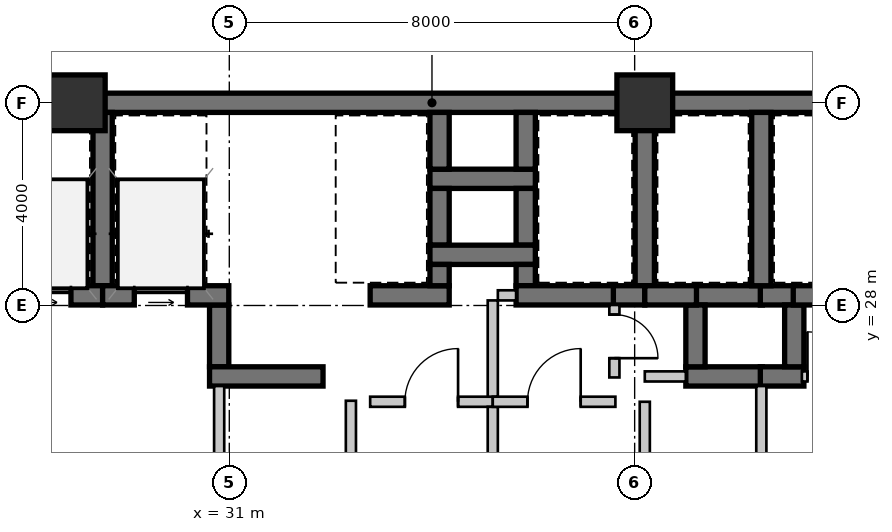
"""IFC4 building model, lengths in metres.
Left out: names, types, materials, properties, quantities, classifications, styles, units other than length and angle.
Written with IfcOpenShell. Run it as: python <this file> out.ifc"""

import sys

from ifc_helpers import new_model, si_unit, direction, frame, frame_2d, origin, origin_2d, place, context, subcontext, project, spatial, rectangle, extrude, source, transform, mapped, element, fill, save


model = new_model("IFC4")
c1 = context("Model", 3, precision=1e-05, world=origin(), true_north=direction((0.0, 1.0)))
c2 = subcontext(c1, "Body", "Model", "MODEL_VIEW")
j1 = project(units=[si_unit("LENGTHUNIT", "METRE"), si_unit("PLANEANGLEUNIT", "RADIAN")], contexts=[c1])
p1 = place(None, origin())
s1 = spatial("IfcSite", under=j1, at=p1, CompositionType="ELEMENT")
p2 = place(p1, origin())
s2 = spatial("IfcBuilding", under=s1, at=p2, CompositionType="ELEMENT")
p3 = place(p2, frame((0.0, 0.0, 12.95)))
s3 = spatial("IfcBuildingStorey", under=s2, at=p3, CompositionType="ELEMENT", Elevation=12.95)
m1 = source(origin(), c2, "Body", "SweptSolid", [
    extrude(rectangle(XDim=1.1, YDim=1.1, at=origin_2d()), origin(), (0.0, 0.0, 1.0), 3.85),
])
for number, where, z_axis, x_axis in (
    (1, (28.0, 32.0, 0.0), (0.0, 0.0, 1.0), (1.0, 0.0, 0.0)),
    (2, (39.2, 32.0, 0.0), (0.0, 0.0, 1.0), (1.0, 0.0, 0.0)),
):
    element("IfcColumn", number, at=place(p3, frame(where, z_axis=z_axis, x_axis=x_axis)), inside=s3, PredefinedType="COLUMN", context=c2, shape_type="MappedRepresentation", body=[
        mapped(m1, transform((0.0, 0.0, 0.0), scale=1.0)),
    ])
m2 = source(origin(), c2, "Body", "SweptSolid", [
    extrude(rectangle(XDim=9.19, YDim=0.38, at=frame_2d((4.595, 0.0))), origin(), (0.0, 0.0, 1.0), 3.43),
])
p4 = place(p3, frame((18.81, 32.0, 0.0), z_axis=(0.0, 0.0, 1.0), x_axis=(1.0, 0.0, 0.0)))
e3 = element("IfcWall", 3, at=p4, inside=s3, PredefinedType="SHEAR", context=c2, shape_type="MappedRepresentation", body=[
    mapped(m2, transform((0.0, 0.0, 0.0), scale=1.0)),
])
m3 = source(origin(), c2, "Body", "SweptSolid", [
    extrude(rectangle(XDim=11.2, YDim=0.38, at=frame_2d((5.6, 0.0))), origin(), (0.0, 0.0, 1.0), 3.43),
])
p5 = place(p3, frame((28.0, 32.0, 0.0), z_axis=(0.0, 0.0, 1.0), x_axis=(1.0, 0.0, 0.0)))
e4 = element("IfcWall", 4, at=p5, inside=s3, PredefinedType="SHEAR", context=c2, shape_type="MappedRepresentation", body=[
    mapped(m3, transform((0.0, 0.0, 0.0), scale=1.0)),
])
m4 = source(origin(), c2, "Body", "SweptSolid", [
    extrude(rectangle(XDim=11.99, YDim=0.38, at=frame_2d((5.995, 0.0))), origin(), (0.0, 0.0, 1.0), 3.43),
])
p6 = place(p3, frame((39.2, 32.0, 0.0), z_axis=(0.0, 0.0, 1.0), x_axis=(1.0, 0.0, 0.0)))
e5 = element("IfcWall", 5, at=p6, inside=s3, PredefinedType="SHEAR", context=c2, shape_type="MappedRepresentation", body=[
    mapped(m4, transform((0.0, 0.0, 0.0), scale=1.0)),
])
m5 = source(origin(), c2, "Body", "SweptSolid", [
    extrude(rectangle(XDim=2.08, YDim=0.38, at=frame_2d((1.04, 0.0))), origin(), (0.0, 0.0, 1.0), 3.43),
])
p7 = place(p3, frame((34.96, 30.5, 0.0), z_axis=(0.0, 0.0, 1.0), x_axis=(1.0, 0.0, 0.0)))
e6 = element("IfcWall", 6, at=p7, inside=s3, PredefinedType="SHEAR", context=c2, shape_type="MappedRepresentation", body=[
    mapped(m5, transform((0.0, 0.0, 0.0), scale=1.0)),
])
m6 = source(origin(), c2, "Body", "SweptSolid", [
    extrude(rectangle(XDim=1.12, YDim=0.38, at=frame_2d((0.56, 0.0))), origin(), (0.0, 0.0, 1.0), 3.43),
])
for number, where, z_axis, x_axis in (
    (7, (35.15, 31.81, 0.0), (0.0, 0.0, 1.0), (0.0, -1.0, 0.0)),
    (8, (36.85, 30.69, 0.0), (0.0, 0.0, 1.0), (0.0, 1.0, 0.0)),
    (9, (35.15, 30.31, 0.0), (0.0, 0.0, 1.0), (0.0, -1.0, 0.0)),
    (10, (36.85, 29.19, 0.0), (0.0, 0.0, 1.0), (0.0, 1.0, 0.0)),
):
    element("IfcWall", number, at=place(p3, frame(where, z_axis=z_axis, x_axis=x_axis)), inside=s3, PredefinedType="SHEAR", context=c2, shape_type="MappedRepresentation", body=[
        mapped(m6, transform((0.0, 0.0, 0.0), scale=1.0)),
    ])
p8 = place(p3, frame((34.96, 29.0, 0.0), z_axis=(0.0, 0.0, 1.0), x_axis=(1.0, 0.0, 0.0)))
e11 = element("IfcWall", 11, at=p8, inside=s3, PredefinedType="SHEAR", context=c2, shape_type="MappedRepresentation", body=[
    mapped(m5, transform((0.0, 0.0, 0.0), scale=1.0)),
])
m7 = source(origin(), c2, "Body", "SweptSolid", [
    extrude(rectangle(XDim=1.22, YDim=0.38, at=frame_2d((0.61, 0.0))), origin(), (0.0, 0.0, 1.0), 3.43),
])
p9 = place(p3, frame((30.8, 28.01, 0.0), z_axis=(0.0, 0.0, 1.0), x_axis=(0.0, -1.0, 0.0)))
e12 = element("IfcWall", 12, at=p9, inside=s3, PredefinedType="SHEAR", context=c2, shape_type="MappedRepresentation", body=[
    mapped(m7, transform((0.0, 0.0, 0.0), scale=1.0)),
])
m8 = source(origin(), c2, "Body", "SweptSolid", [
    extrude(rectangle(XDim=2.24, YDim=0.38, at=frame_2d((1.12, 0.0))), origin(), (0.0, 0.0, 1.0), 3.43),
])
p10 = place(p3, frame((30.61, 26.6, 0.0), z_axis=(0.0, 0.0, 1.0), x_axis=(1.0, 0.0, 0.0)))
e13 = element("IfcWall", 13, at=p10, inside=s3, PredefinedType="SHEAR", context=c2, shape_type="MappedRepresentation", body=[
    mapped(m8, transform((0.0, 0.0, 0.0), scale=1.0)),
])
m9 = source(origin(), c2, "Body", "SweptSolid", [
    extrude(rectangle(XDim=1.32, YDim=0.38, at=frame_2d((0.66, 0.0))), origin(), (0.0, 0.0, 1.0), 3.43),
])
p11 = place(p3, frame((41.52, 28.2, 0.0), z_axis=(0.0, 0.0, 1.0), x_axis=(-1.0, 0.0, 0.0)))
e14 = element("IfcWall", 14, at=p11, inside=s3, PredefinedType="SHEAR", context=c2, shape_type="MappedRepresentation", body=[
    mapped(m9, transform((0.0, 0.0, 0.0), scale=1.0)),
])
m10 = source(origin(), c2, "Body", "SweptSolid", [
    extrude(rectangle(XDim=0.67, YDim=0.38, at=frame_2d((0.335, 0.0))), origin(), (0.0, 0.0, 1.0), 3.43),
])
p12 = place(p3, frame((42.15, 28.2, 0.0), z_axis=(0.0, 0.0, 1.0), x_axis=(-1.0, 0.0, 0.0)))
e15 = element("IfcWall", 15, at=p12, inside=s3, PredefinedType="SHEAR", context=c2, shape_type="MappedRepresentation", body=[
    mapped(m10, transform((0.0, 0.0, 0.0), scale=1.0)),
])
m11 = source(origin(), c2, "Body", "SweptSolid", [
    extrude(rectangle(XDim=1.51, YDim=0.38, at=frame_2d((0.755, 0.0))), origin(), (0.0, 0.0, 1.0), 3.43),
])
p13 = place(p3, frame((40.01, 26.6, 0.0), z_axis=(0.0, 0.0, 1.0), x_axis=(1.0, 0.0, 0.0)))
e16 = element("IfcWall", 16, at=p13, inside=s3, PredefinedType="SHEAR", context=c2, shape_type="MappedRepresentation", body=[
    mapped(m11, transform((0.0, 0.0, 0.0), scale=1.0)),
])
p14 = place(p3, frame((40.2, 28.01, 0.0), z_axis=(0.0, 0.0, 1.0), x_axis=(0.0, -1.0, 0.0)))
e17 = element("IfcWall", 17, at=p14, inside=s3, PredefinedType="SHEAR", context=c2, shape_type="MappedRepresentation", body=[
    mapped(m7, transform((0.0, 0.0, 0.0), scale=1.0)),
])
m12 = source(origin(), c2, "Body", "SweptSolid", [
    extrude(rectangle(XDim=0.86, YDim=0.38, at=frame_2d((0.43, 0.0))), origin(), (0.0, 0.0, 1.0), 3.43),
])
p15 = place(p3, frame((41.48, 26.6, 0.0), z_axis=(0.0, 0.0, 1.0), x_axis=(1.0, 0.0, 0.0)))
e18 = element("IfcWall", 18, at=p15, inside=s3, PredefinedType="SHEAR", context=c2, shape_type="MappedRepresentation", body=[
    mapped(m12, transform((0.0, 0.0, 0.0), scale=1.0)),
])
p16 = place(p3, frame((42.15, 26.79, 0.0), z_axis=(0.0, 0.0, 1.0), x_axis=(0.0, 1.0, 0.0)))
e19 = element("IfcWall", 19, at=p16, inside=s3, PredefinedType="SHEAR", context=c2, shape_type="MappedRepresentation", body=[
    mapped(m7, transform((0.0, 0.0, 0.0), scale=1.0)),
])
m13 = source(origin(), c2, "Body", "SweptSolid", [
    extrude(rectangle(XDim=3.42, YDim=0.38, at=frame_2d((1.71, 0.0))), origin(), (0.0, 0.0, 1.0), 3.43),
])
p17 = place(p3, frame((28.5, 28.39, 0.0), z_axis=(0.0, 0.0, 1.0), x_axis=(0.0, 1.0, 0.0)))
e20 = element("IfcWall", 20, at=p17, inside=s3, PredefinedType="SHEAR", context=c2, shape_type="MappedRepresentation", body=[
    mapped(m13, transform((0.0, 0.0, 0.0), scale=1.0)),
])
m14 = source(origin(), c2, "Body", "SweptSolid", [
    extrude(rectangle(XDim=2.07, YDim=0.38, at=frame_2d((1.035, 0.0))), origin(), (0.0, 0.0, 1.0), 3.43),
])
p18 = place(p3, frame((26.43, 28.2, 0.0), z_axis=(0.0, 0.0, 1.0), x_axis=(1.0, 0.0, 0.0)))
e21 = element("IfcWall", 21, at=p18, inside=s3, PredefinedType="SHEAR", context=c2, shape_type="MappedRepresentation", body=[
    mapped(m14, transform((0.0, 0.0, 0.0), scale=1.0)),
])
m15 = source(origin(), c2, "Body", "SweptSolid", [
    extrude(rectangle(XDim=1.05, YDim=2.15, at=frame_2d((0.525, 1.075))), frame((0.0, 0.2, 0.0), z_axis=(0.0, -1.0, 0.0), x_axis=(1.0, 0.0, 0.0)), (0.0, 0.0, 1.0), 0.4),
])
p19 = place(p18, frame((0.395, 0.0, 0.0)))
e22 = element("IfcOpeningElement", 22, at=p19, cuts=e21, PredefinedType="OPENING", context=c2, shape_type="MappedRepresentation", body=[
    mapped(m15, transform((0.0, 0.0, 0.0), scale=1.0)),
])
m16 = source(origin(), c2, "Body", "SweptSolid", [
    extrude(rectangle(XDim=2.49, YDim=0.38, at=frame_2d((1.245, 0.0))), origin(), (0.0, 0.0, 1.0), 3.43),
])
p20 = place(p3, frame((28.5, 28.2, 0.0), z_axis=(0.0, 0.0, 1.0), x_axis=(1.0, 0.0, 0.0)))
e23 = element("IfcWall", 23, at=p20, inside=s3, PredefinedType="SHEAR", context=c2, shape_type="MappedRepresentation", body=[
    mapped(m16, transform((0.0, 0.0, 0.0), scale=1.0)),
])
p21 = place(p20, frame((0.625, 0.0, 0.0)))
e24 = element("IfcOpeningElement", 24, at=p21, cuts=e23, PredefinedType="OPENING", context=c2, shape_type="MappedRepresentation", body=[
    mapped(m15, transform((0.0, 0.0, 0.0), scale=1.0)),
])
m17 = source(origin(), c2, "Body", "SweptSolid", [
    extrude(rectangle(XDim=2.31, YDim=0.2, at=frame_2d((1.155, 0.0))), origin(), (0.0, 0.0, 1.0), 3.43),
])
p22 = place(p3, frame((30.8, 26.41, 0.0), z_axis=(0.0, 0.0, 1.0), x_axis=(0.0, -1.0, 0.0)))
e25 = element("IfcWall", 25, at=p22, inside=s3, PredefinedType="SOLIDWALL", context=c2, shape_type="MappedRepresentation", body=[
    mapped(m17, transform((0.0, 0.0, 0.0), scale=1.0)),
])
m18 = source(origin(), c2, "Body", "SweptSolid", [
    extrude(rectangle(XDim=1.56, YDim=0.38, at=frame_2d((0.78, 0.0))), origin(), (0.0, 0.0, 1.0), 3.43),
])
p23 = place(p3, frame((33.78, 28.2, 0.0), z_axis=(0.0, 0.0, 1.0), x_axis=(1.0, 0.0, 0.0)))
e26 = element("IfcWall", 26, at=p23, inside=s3, PredefinedType="SHEAR", context=c2, shape_type="MappedRepresentation", body=[
    mapped(m18, transform((0.0, 0.0, 0.0), scale=1.0)),
])
m19 = source(origin(), c2, "Body", "SweptSolid", [
    extrude(rectangle(XDim=0.42, YDim=0.38, at=frame_2d((0.21, 0.0))), origin(), (0.0, 0.0, 1.0), 3.43),
])
p24 = place(p3, frame((35.15, 28.39, 0.0), z_axis=(0.0, 0.0, 1.0), x_axis=(0.0, 1.0, 0.0)))
e27 = element("IfcWall", 27, at=p24, inside=s3, PredefinedType="SHEAR", context=c2, shape_type="MappedRepresentation", body=[
    mapped(m19, transform((0.0, 0.0, 0.0), scale=1.0)),
])
p25 = place(p3, frame((39.2, 28.39, 0.0), z_axis=(0.0, 0.0, 1.0), x_axis=(0.0, 1.0, 0.0)))
e28 = element("IfcWall", 28, at=p25, inside=s3, PredefinedType="SHEAR", context=c2, shape_type="MappedRepresentation", body=[
    mapped(m13, transform((0.0, 0.0, 0.0), scale=1.0)),
])
p26 = place(p3, frame((36.85, 28.81, 0.0), z_axis=(0.0, 0.0, 1.0), x_axis=(0.0, -1.0, 0.0)))
e29 = element("IfcWall", 29, at=p26, inside=s3, PredefinedType="SHEAR", context=c2, shape_type="MappedRepresentation", body=[
    mapped(m19, transform((0.0, 0.0, 0.0), scale=1.0)),
])
m20 = source(origin(), c2, "Body", "SweptSolid", [
    extrude(rectangle(XDim=1.96, YDim=0.38, at=frame_2d((0.98, 0.0))), origin(), (0.0, 0.0, 1.0), 3.43),
])
p27 = place(p3, frame((36.66, 28.2, 0.0), z_axis=(0.0, 0.0, 1.0), x_axis=(1.0, 0.0, 0.0)))
e30 = element("IfcWall", 30, at=p27, inside=s3, PredefinedType="SHEAR", context=c2, shape_type="MappedRepresentation", body=[
    mapped(m20, transform((0.0, 0.0, 0.0), scale=1.0)),
])
m21 = source(origin(), c2, "Body", "SweptSolid", [
    extrude(rectangle(XDim=0.62, YDim=0.38, at=frame_2d((0.31, 0.0))), origin(), (0.0, 0.0, 1.0), 3.43),
])
p28 = place(p3, frame((38.58, 28.2, 0.0), z_axis=(0.0, 0.0, 1.0), x_axis=(1.0, 0.0, 0.0)))
e31 = element("IfcWall", 31, at=p28, inside=s3, PredefinedType="SHEAR", context=c2, shape_type="MappedRepresentation", body=[
    mapped(m21, transform((0.0, 0.0, 0.0), scale=1.0)),
])
p29 = place(p3, frame((41.5, 28.39, 0.0), z_axis=(0.0, 0.0, 1.0), x_axis=(0.0, 1.0, 0.0)))
e32 = element("IfcWall", 32, at=p29, inside=s3, PredefinedType="SHEAR", context=c2, shape_type="MappedRepresentation", body=[
    mapped(m13, transform((0.0, 0.0, 0.0), scale=1.0)),
])
m22 = source(origin(), c2, "Body", "SweptSolid", [
    extrude(rectangle(XDim=1.02, YDim=0.38, at=frame_2d((0.51, 0.0))), origin(), (0.0, 0.0, 1.0), 3.43),
])
p30 = place(p3, frame((39.2, 28.2, 0.0), z_axis=(0.0, 0.0, 1.0), x_axis=(1.0, 0.0, 0.0)))
e33 = element("IfcWall", 33, at=p30, inside=s3, PredefinedType="SHEAR", context=c2, shape_type="MappedRepresentation", body=[
    mapped(m22, transform((0.0, 0.0, 0.0), scale=1.0)),
])
m23 = source(origin(), c2, "Body", "SweptSolid", [
    extrude(rectangle(XDim=1.44, YDim=0.38, at=frame_2d((0.72, 0.0))), origin(), (0.0, 0.0, 1.0), 3.43),
])
p31 = place(p3, frame((42.13, 28.2, 0.0), z_axis=(0.0, 0.0, 1.0), x_axis=(1.0, 0.0, 0.0)))
e34 = element("IfcWall", 34, at=p31, inside=s3, PredefinedType="SHEAR", context=c2, shape_type="MappedRepresentation", body=[
    mapped(m23, transform((0.0, 0.0, 0.0), scale=1.0)),
])
m24 = source(origin(), c2, "Body", "SweptSolid", [
    extrude(rectangle(XDim=2.02, YDim=0.2, at=frame_2d((1.01, 0.0))), origin(), (0.0, 0.0, 1.0), 3.43),
])
p32 = place(p3, frame((33.4, 26.12, 0.0), z_axis=(0.0, 0.0, 1.0), x_axis=(0.0, -1.0, 0.0)))
e35 = element("IfcWall", 35, at=p32, inside=s3, PredefinedType="SOLIDWALL", context=c2, shape_type="MappedRepresentation", body=[
    mapped(m24, transform((0.0, 0.0, 0.0), scale=1.0)),
])
m25 = source(origin(), c2, "Body", "SweptSolid", [
    extrude(rectangle(XDim=2.42, YDim=0.2, at=frame_2d((1.21, 0.0))), origin(), (0.0, 0.0, 1.0), 3.43),
])
p33 = place(p3, frame((33.78, 26.1, 0.0), z_axis=(0.0, 0.0, 1.0), x_axis=(1.0, 0.0, 0.0)))
e36 = element("IfcWall", 36, at=p33, inside=s3, PredefinedType="SOLIDWALL", context=c2, shape_type="MappedRepresentation", body=[
    mapped(m25, transform((0.0, 0.0, 0.0), scale=1.0)),
])
m26 = source(origin(), c2, "Body", "SweptSolid", [
    extrude(rectangle(XDim=1.05, YDim=2.1, at=frame_2d((0.525, 1.05))), frame((0.0, 0.11, 0.0), z_axis=(0.0, -1.0, 0.0), x_axis=(1.0, 0.0, 0.0)), (0.0, 0.0, 1.0), 0.22),
])
p34 = place(p33, frame((0.685, 0.0, 0.0)))
e37 = element("IfcOpeningElement", 37, at=p34, cuts=e36, PredefinedType="OPENING", context=c2, shape_type="MappedRepresentation", body=[
    mapped(m26, transform((0.0, 0.0, 0.0), scale=1.0)),
])
m27 = source(origin(), c2, "Body", "SweptSolid", [
    extrude(rectangle(XDim=1.9, YDim=0.2, at=frame_2d((0.95, 0.0))), origin(), (0.0, 0.0, 1.0), 3.43),
])
p35 = place(p3, frame((36.2, 26.0, 0.0), z_axis=(0.0, 0.0, 1.0), x_axis=(0.0, -1.0, 0.0)))
e38 = element("IfcWall", 38, at=p35, inside=s3, PredefinedType="SOLIDWALL", context=c2, shape_type="MappedRepresentation", body=[
    mapped(m27, transform((0.0, 0.0, 0.0), scale=1.0)),
])
m28 = source(origin(), c2, "Body", "SweptSolid", [
    extrude(rectangle(XDim=1.9, YDim=0.2, at=frame_2d((0.95, 0.0))), origin(), (0.0, 0.0, 1.0), 3.43),
])
p36 = place(p3, frame((36.2, 28.1, 0.0), z_axis=(0.0, 0.0, 1.0), x_axis=(0.0, -1.0, 0.0)))
e39 = element("IfcWall", 39, at=p36, inside=s3, PredefinedType="SOLIDWALL", context=c2, shape_type="MappedRepresentation", body=[
    mapped(m28, transform((0.0, 0.0, 0.0), scale=1.0)),
])
m29 = source(origin(), c2, "Body", "SweptSolid", [
    extrude(rectangle(XDim=0.36, YDim=0.2, at=frame_2d((0.18, 0.0))), origin(), (0.0, 0.0, 1.0), 3.43),
])
p37 = place(p3, frame((36.66, 28.2, 0.0), z_axis=(0.0, 0.0, 1.0), x_axis=(-1.0, 0.0, 0.0)))
e40 = element("IfcWall", 40, at=p37, inside=s3, PredefinedType="SOLIDWALL", context=c2, shape_type="MappedRepresentation", body=[
    mapped(m29, transform((0.0, 0.0, 0.0), scale=1.0)),
])
m30 = source(origin(), c2, "Body", "SweptSolid", [
    extrude(rectangle(XDim=2.42, YDim=0.2, at=frame_2d((1.21, 0.0))), origin(), (0.0, 0.0, 1.0), 3.43),
])
p38 = place(p3, frame((36.2, 26.1, 0.0), z_axis=(0.0, 0.0, 1.0), x_axis=(1.0, 0.0, 0.0)))
e41 = element("IfcWall", 41, at=p38, inside=s3, PredefinedType="SOLIDWALL", context=c2, shape_type="MappedRepresentation", body=[
    mapped(m30, transform((0.0, 0.0, 0.0), scale=1.0)),
])
p39 = place(p38, frame((0.685, 0.0, 0.0)))
e42 = element("IfcOpeningElement", 42, at=p39, cuts=e41, PredefinedType="OPENING", context=c2, shape_type="MappedRepresentation", body=[
    mapped(m26, transform((0.0, 0.0, 0.0), scale=1.0)),
])
m31 = source(origin(), c2, "Body", "SweptSolid", [
    extrude(rectangle(XDim=2.0, YDim=0.2, at=frame_2d((1.0, 0.0))), origin(), (0.0, 0.0, 1.0), 2.97),
])
p40 = place(p3, frame((39.2, 26.1, 0.0), z_axis=(0.0, 0.0, 1.0), x_axis=(0.0, -1.0, 0.0)))
e43 = element("IfcWall", 43, at=p40, inside=s3, PredefinedType="SOLIDWALL", context=c2, shape_type="MappedRepresentation", body=[
    mapped(m31, transform((0.0, 0.0, 0.0), scale=1.0)),
])
m32 = source(origin(), c2, "Body", "SweptSolid", [
    extrude(rectangle(XDim=1.43, YDim=0.2, at=frame_2d((0.715, 0.0))), origin(), (0.0, 0.0, 1.0), 3.43),
])
p41 = place(p3, frame((38.6, 28.01, 0.0), z_axis=(0.0, 0.0, 1.0), x_axis=(0.0, -1.0, 0.0)))
e44 = element("IfcWall", 44, at=p41, inside=s3, PredefinedType="SOLIDWALL", context=c2, shape_type="MappedRepresentation", body=[
    mapped(m32, transform((0.0, 0.0, 0.0), scale=1.0)),
])
m33 = source(origin(), c2, "Body", "SweptSolid", [
    extrude(rectangle(XDim=0.86, YDim=2.1, at=frame_2d((0.43, 1.05))), frame((0.0, 0.11, 0.0), z_axis=(0.0, -1.0, 0.0), x_axis=(1.0, 0.0, 0.0)), (0.0, 0.0, 1.0), 0.22),
])
p42 = place(p41, frame((0.19, 0.0, 0.0)))
e45 = element("IfcOpeningElement", 45, at=p42, cuts=e44, PredefinedType="OPENING", context=c2, shape_type="MappedRepresentation", body=[
    mapped(m33, transform((0.0, 0.0, 0.0), scale=1.0)),
])
m34 = source(origin(), c2, "Body", "SweptSolid", [
    extrude(rectangle(XDim=0.81, YDim=0.2, at=frame_2d((0.405, 0.0))), origin(), (0.0, 0.0, 1.0), 3.43),
])
p43 = place(p3, frame((39.2, 26.6, 0.0), z_axis=(0.0, 0.0, 1.0), x_axis=(1.0, 0.0, 0.0)))
e46 = element("IfcWall", 46, at=p43, inside=s3, PredefinedType="SOLIDWALL", context=c2, shape_type="MappedRepresentation", body=[
    mapped(m34, transform((0.0, 0.0, 0.0), scale=1.0)),
])
p44 = place(p3, frame((41.5, 26.41, 0.0), z_axis=(0.0, 0.0, 1.0), x_axis=(0.0, -1.0, 0.0)))
e47 = element("IfcWall", 47, at=p44, inside=s3, PredefinedType="SOLIDWALL", context=c2, shape_type="MappedRepresentation", body=[
    mapped(m17, transform((0.0, 0.0, 0.0), scale=1.0)),
])
m35 = source(origin(), c2, "Body", "SweptSolid", [
    extrude(rectangle(XDim=1.25, YDim=0.2, at=frame_2d((0.625, 0.0))), origin(), (0.0, 0.0, 1.0), 3.43),
])
p45 = place(p3, frame((42.3, 26.6, 0.0), z_axis=(0.0, 0.0, 1.0), x_axis=(1.0, 0.0, 0.0)))
e48 = element("IfcWall", 48, at=p45, inside=s3, PredefinedType="SOLIDWALL", context=c2, shape_type="MappedRepresentation", body=[
    mapped(m35, transform((0.0, 0.0, 0.0), scale=1.0)),
])
m36 = source(origin(), c2, "Body", "SweptSolid", [
    extrude(rectangle(XDim=0.88, YDim=2.1, at=frame_2d((0.44, 1.05))), frame((0.0, 0.11, 0.0), z_axis=(0.0, -1.0, 0.0), x_axis=(1.0, 0.0, 0.0)), (0.0, 0.0, 1.0), 0.22),
])
p46 = place(p45, frame((0.11, 0.0, 0.0)))
e49 = element("IfcOpeningElement", 49, at=p46, cuts=e48, PredefinedType="OPENING", context=c2, shape_type="MappedRepresentation", body=[
    mapped(m36, transform((0.0, 0.0, 0.0), scale=1.0)),
])
m37 = source(origin(), c2, "Body", "SweptSolid", [
    extrude(rectangle(XDim=1.05, YDim=2.15, at=frame_2d((0.525, 1.075))), frame((0.0, 0.025, 0.0), z_axis=(0.0, -1.0, 0.0), x_axis=(1.0, 0.0, 0.0)), (0.0, 0.0, 1.0), 0.05),
])
p47 = place(p19, origin())
e50 = element("IfcDoor", 50, at=p47, inside=s3, OperationType="SLIDING_TO_LEFT", PredefinedType="DOOR", context=c2, shape_type="MappedRepresentation", body=[
    mapped(m37, transform((0.0, 0.0, 0.0), scale=1.0)),
])
fill(e22, e50)
p48 = place(p21, origin())
e51 = element("IfcDoor", 51, at=p48, inside=s3, OperationType="SLIDING_TO_LEFT", PredefinedType="DOOR", context=c2, shape_type="MappedRepresentation", body=[
    mapped(m37, transform((0.0, 0.0, 0.0), scale=1.0)),
])
fill(e24, e51)
m38 = source(origin(), c2, "Body", "SweptSolid", [
    extrude(rectangle(XDim=1.05, YDim=2.1, at=frame_2d((0.525, 1.05))), frame((0.0, 0.025, 0.0), z_axis=(0.0, -1.0, 0.0), x_axis=(1.0, 0.0, 0.0)), (0.0, 0.0, 1.0), 0.05),
])
p49 = place(p34, origin())
e52 = element("IfcDoor", 52, at=p49, inside=s3, OperationType="SINGLE_SWING_RIGHT", PredefinedType="DOOR", context=c2, shape_type="MappedRepresentation", body=[
    mapped(m38, transform((0.0, 0.0, 0.0), scale=1.0)),
])
fill(e37, e52)
p50 = place(p39, origin())
e53 = element("IfcDoor", 53, at=p50, inside=s3, OperationType="SINGLE_SWING_RIGHT", PredefinedType="DOOR", context=c2, shape_type="MappedRepresentation", body=[
    mapped(m38, transform((0.0, 0.0, 0.0), scale=1.0)),
])
fill(e42, e53)
m39 = source(origin(), c2, "Body", "SweptSolid", [
    extrude(rectangle(XDim=0.88, YDim=2.1, at=frame_2d((0.44, 1.05))), frame((0.0, 0.025, 0.0), z_axis=(0.0, -1.0, 0.0), x_axis=(1.0, 0.0, 0.0)), (0.0, 0.0, 1.0), 0.05),
])
p51 = place(p46, origin())
e54 = element("IfcDoor", 54, at=p51, inside=s3, OperationType="SINGLE_SWING_LEFT", PredefinedType="DOOR", context=c2, shape_type="MappedRepresentation", body=[
    mapped(m39, transform((0.0, 0.0, 0.0), scale=1.0)),
])
fill(e49, e54)
m40 = source(origin(), c2, "Body", "SweptSolid", [
    extrude(rectangle(XDim=0.86, YDim=2.1, at=frame_2d((0.43, 1.05))), frame((0.0, 0.025, 0.0), z_axis=(0.0, -1.0, 0.0), x_axis=(1.0, 0.0, 0.0)), (0.0, 0.0, 1.0), 0.05),
])
p52 = place(p42, origin())
e55 = element("IfcDoor", 55, at=p52, inside=s3, OperationType="SINGLE_SWING_RIGHT", PredefinedType="DOOR", context=c2, shape_type="MappedRepresentation", body=[
    mapped(m40, transform((0.0, 0.0, 0.0), scale=1.0)),
])
fill(e45, e55)
save(model, sys.argv[1])
